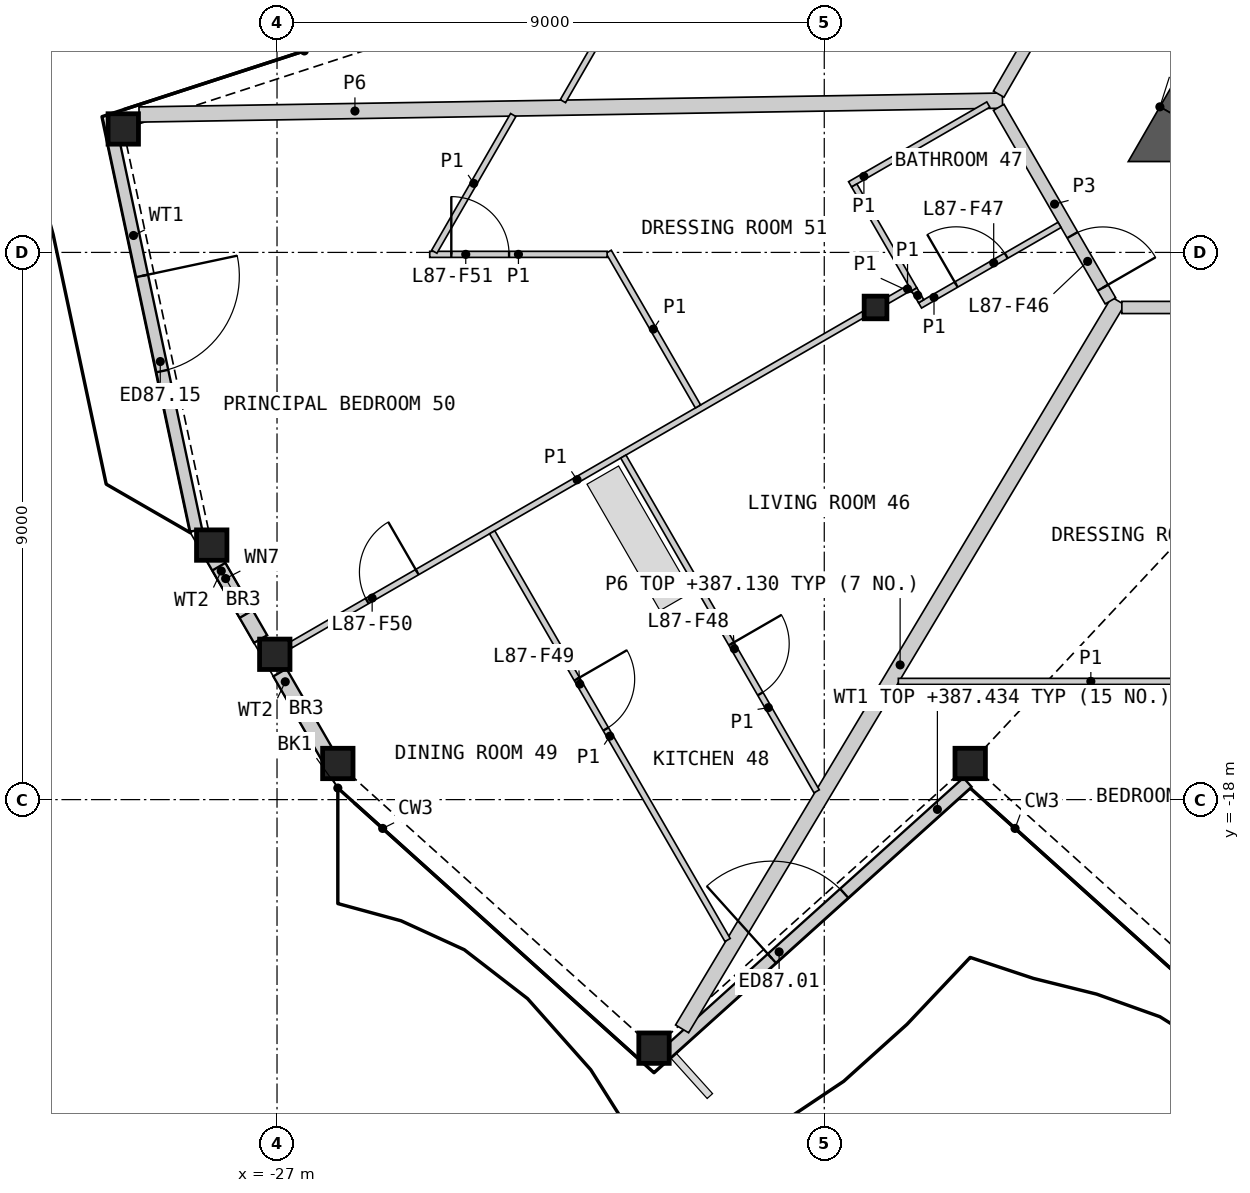
"""IFC4 building model, lengths in metres.
Left out: names, types, materials, properties, quantities, classifications, styles, units other than length and angle.
Written with IfcOpenShell. Run it as: python <this file> out.ifc"""

import sys

from ifc_helpers import new_model, si_unit, direction, frame, frame_2d, origin, origin_2d, place, context, subcontext, project, spatial, polyline, rectangle, hollow_rectangle, i_section, outline, extrude, element, fill, save


model = new_model("IFC4")
c1 = context("Model", 3, precision=1e-05, world=origin(), true_north=direction((0.0, 1.0)))
c2 = subcontext(c1, "Body", "Model", "MODEL_VIEW")
j1 = project(units=[si_unit("LENGTHUNIT", "METRE"), si_unit("PLANEANGLEUNIT", "RADIAN")], contexts=[c1])
p1 = place(None, origin())
s1 = spatial("IfcSite", under=j1, at=p1, CompositionType="ELEMENT")
p2 = place(p1, origin())
s2 = spatial("IfcBuilding", under=s1, at=p2, CompositionType="ELEMENT")
p3 = place(p2, frame((0.0, 0.0, 384.8)))
s3 = spatial("IfcBuildingStorey", under=s2, at=p3, CompositionType="ELEMENT", Elevation=384.8)
for number, where, z_axis, x_axis in (
    (1, (-26.0, -17.406, 0.0), (0.0, 0.0, 1.0), (1.0, 0.0, 0.0)),
    (2, (-20.8, -22.088, 0.0), (0.0, 0.0, 1.0), (1.0, 0.0, 0.0)),
    (3, (-15.6, -17.406, 0.0), (0.0, 0.0, 1.0), (1.0, 0.0, 0.0)),
    (4, (-29.529, -6.969, 0.0), (0.0, 0.0, 1.0), (1.0, 0.0, 0.0)),
    (5, (-28.074, -13.814, 0.0), (0.0, 0.0, 1.0), (1.0, 0.0, 0.0)),
    (6, (-27.037, -15.61, 0.0), (0.0, 0.0, 1.0), (1.0, 0.0, 0.0)),
):
    element("IfcColumn", number, at=place(p3, frame(where, z_axis=z_axis, x_axis=x_axis)), inside=s3, PredefinedType="COLUMN", context=c2, shape_type="SweptSolid", body=[
        extrude(hollow_rectangle(XDim=0.5, YDim=0.5, WallThickness=0.03, at=origin_2d()), origin(), (0.0, 0.0, 1.0), 3.4),
    ])
p4 = place(p3, frame((-17.157, -9.906, 0.0), z_axis=(0.0, 0.0, 1.0), x_axis=(1.0, 0.0, 0.0)))
e7 = element("IfcColumn", 7, at=p4, inside=s3, PredefinedType="COLUMN", context=c2, shape_type="SweptSolid", body=[
    extrude(i_section(OverallWidth=0.374, OverallDepth=0.372, WebThickness=0.016, FlangeThickness=0.026, at=origin_2d()), origin(), (0.0, 0.0, 1.0), 3.4),
])
p5 = place(p3, frame((-20.595, -22.173, 0.0), z_axis=(0.0, 0.0, 1.0), x_axis=(0.743135582201, 0.669140871915, 0.0)))
e8 = element("IfcWall", 8, at=p5, inside=s3, PredefinedType="SOLIDWALL", context=c2, shape_type="SweptSolid", body=[
    extrude(rectangle(XDim=6.662, YDim=0.2, at=frame_2d((3.331, 0.0))), origin(), (0.0, 0.0, 1.0), 2.634),
])
p6 = place(p5, frame((2.333, 0.0, 0.0)))
e9 = element("IfcOpeningElement", 9, at=p6, cuts=e8, PredefinedType="OPENING", context=c2, shape_type="SweptSolid", body=[
    extrude(rectangle(XDim=1.6, YDim=2.25, at=frame_2d((0.8, 1.125))), frame((0.0, 0.11, 0.0), z_axis=(0.0, -1.0, 0.0), x_axis=(1.0, 0.0, 0.0)), (0.0, 0.0, 1.0), 0.22),
])
p7 = place(p3, frame((-29.705, -7.105, 0.0), z_axis=(0.0, 0.0, 1.0), x_axis=(0.207924998532, -0.978144771997, 0.0)))
e10 = element("IfcWall", 10, at=p7, inside=s3, PredefinedType="SOLIDWALL", context=c2, shape_type="SweptSolid", body=[
    extrude(rectangle(XDim=6.612, YDim=0.2, at=frame_2d((3.306, 0.0))), origin(), (0.0, 0.0, 1.0), 2.634),
])
p8 = place(p7, frame((2.333, 0.0, 0.0)))
e11 = element("IfcOpeningElement", 11, at=p8, cuts=e10, PredefinedType="OPENING", context=c2, shape_type="SweptSolid", body=[
    extrude(rectangle(XDim=1.6, YDim=2.25, at=frame_2d((0.8, 1.125))), frame((0.0, 0.11, 0.0), z_axis=(0.0, -1.0, 0.0), x_axis=(1.0, 0.0, 0.0)), (0.0, 0.0, 1.0), 0.22),
])
p9 = place(p3, frame((-28.132, -13.866, 0.0), z_axis=(0.0, 0.0, 1.0), x_axis=(0.499975693202, -0.866039436866, 0.0)))
e12 = element("IfcWall", 12, at=p9, inside=s3, PredefinedType="SOLIDWALL", context=c2, shape_type="SweptSolid", body=[
    extrude(rectangle(XDim=1.725, YDim=0.25, at=frame_2d((0.862, 0.0))), origin(), (0.0, 0.0, 1.0), 2.634),
])
p10 = place(p9, frame((0.35, 0.0, 1.8)))
e13 = element("IfcOpeningElement", 13, at=p10, cuts=e12, PredefinedType="OPENING", context=c2, shape_type="SweptSolid", body=[
    extrude(rectangle(XDim=0.9, YDim=0.6, at=frame_2d((0.45, 0.3))), frame((0.0, 0.135, 0.0), z_axis=(0.0, -1.0, 0.0), x_axis=(1.0, 0.0, 0.0)), (0.0, 0.0, 1.0), 0.27),
])
p11 = place(p3, frame((-26.953, -15.91, 0.0), z_axis=(0.0, 0.0, 1.0), x_axis=(0.500027377864, -0.86600959659, 0.0)))
e14 = element("IfcWall", 14, at=p11, inside=s3, PredefinedType="SOLIDWALL", context=c2, shape_type="SweptSolid", body=[
    extrude(rectangle(XDim=1.756, YDim=0.25, at=frame_2d((0.878, 0.0))), origin(), (0.0, 0.0, 1.0), 2.634),
])
p12 = place(p3, frame((-9.562, -2.15, 0.0), z_axis=(0.0, 0.0, 1.0), x_axis=(-0.500015214976, -0.866016619236, 0.0)))
e15 = element("IfcWall", 15, at=p12, inside=s3, PredefinedType="SHEAR", context=c2, shape_type="SweptSolid", body=[
    extrude(rectangle(XDim=5.318, YDim=0.6, at=frame_2d((2.659, 0.0))), origin(), (0.0, 0.0, 1.0), 3.1),
])
p13 = place(p3, origin())
e16 = element("IfcWall", 16, at=p13, inside=s3, PredefinedType="SHEAR", context=c2, shape_type="SweptSolid", body=[
    extrude(outline(polyline([(-12.48, -6.606), (-11.961, -6.906), (-11.961, -7.506), (-13.0, -7.506), (-12.48, -6.606)])), origin(), (0.0, 0.0, 1.0), 3.1),
])
p14 = place(p3, frame((-20.338, -21.771, 0.0), z_axis=(0.0, 0.0, 1.0), x_axis=(0.513878217441, 0.857863146218, 0.0)))
e17 = element("IfcWall", 17, at=p14, inside=s3, PredefinedType="PARTITIONING", context=c2, shape_type="SweptSolid", body=[
    extrude(rectangle(XDim=13.956, YDim=0.25, at=frame_2d((6.978, 0.0))), origin(), (0.0, 0.0, 1.0), 2.33),
])
p15 = place(p3, frame((-29.269, -6.732, 0.0), z_axis=(0.0, 0.0, 1.0), x_axis=(0.999870533117, 0.016090898164, 0.0)))
e18 = element("IfcWall", 18, at=p15, inside=s3, PredefinedType="PARTITIONING", context=c2, shape_type="SweptSolid", body=[
    extrude(rectangle(XDim=14.202, YDim=0.25, at=frame_2d((7.101, 0.0))), origin(), (0.0, 0.0, 1.0), 2.33),
])
p16 = place(p3, frame((-13.106, -9.906, 0.0), z_axis=(0.0, 0.0, 1.0), x_axis=(1.0, 0.0, 0.0)))
e19 = element("IfcWall", 19, at=p16, inside=s3, PredefinedType="PARTITIONING", context=c2, shape_type="SweptSolid", body=[
    extrude(rectangle(XDim=4.331, YDim=0.2, at=frame_2d((2.165, 0.0))), origin(), (0.0, 0.0, 1.0), 3.1),
])
p17 = place(p3, frame((-15.131, -6.397, 0.0), z_axis=(0.0, 0.0, 1.0), x_axis=(0.499986217557, 0.866033360935, 0.0)))
e20 = element("IfcWall", 20, at=p17, inside=s3, PredefinedType="PARTITIONING", context=c2, shape_type="SweptSolid", body=[
    extrude(rectangle(XDim=4.3, YDim=0.2, at=frame_2d((2.15, 0.0))), origin(), (0.0, 0.0, 1.0), 3.1),
])
p18 = place(p3, frame((-15.131, -6.614, 0.0), z_axis=(0.0, 0.0, 1.0), x_axis=(0.499967746641, -0.866044024469, 0.0)))
e21 = element("IfcWall", 21, at=p18, inside=s3, PredefinedType="PARTITIONING", context=c2, shape_type="SweptSolid", body=[
    extrude(rectangle(XDim=3.676, YDim=0.2, at=frame_2d((1.838, 0.0))), origin(), (0.0, 0.0, 1.0), 3.1),
])
p19 = place(p18, frame((2.426, 0.0, 0.0)))
e22 = element("IfcOpeningElement", 22, at=p19, cuts=e21, PredefinedType="OPENING", context=c2, shape_type="SweptSolid", body=[
    extrude(rectangle(XDim=1.0, YDim=2.1, at=frame_2d((0.5, 1.05))), frame((0.0, 0.11, 0.0), z_axis=(0.0, -1.0, 0.0), x_axis=(1.0, 0.0, 0.0)), (0.0, 0.0, 1.0), 0.22),
])
p20 = place(p3, frame((-26.777, -15.46, 0.0), z_axis=(0.0, 0.0, 1.0), x_axis=(0.866019680922, 0.500009912158, 0.0)))
e23 = element("IfcWall", 23, at=p20, inside=s3, PredefinedType="PARTITIONING", context=c2, shape_type="SweptSolid", body=[
    extrude(rectangle(XDim=10.881, YDim=0.1, at=frame_2d((5.44, 0.0))), origin(), (0.0, 0.0, 1.0), 2.33),
])
p21 = place(p20, frame((1.454, 0.0, 0.0)))
e24 = element("IfcOpeningElement", 24, at=p21, cuts=e23, PredefinedType="OPENING", context=c2, shape_type="SweptSolid", body=[
    extrude(rectangle(XDim=0.95, YDim=2.1, at=frame_2d((0.475, 1.05))), frame((0.0, 0.06, 0.0), z_axis=(0.0, -1.0, 0.0), x_axis=(1.0, 0.0, 0.0)), (0.0, 0.0, 1.0), 0.12),
])
p22 = place(p3, frame((-23.462, -13.603, 0.0), z_axis=(0.0, 0.0, 1.0), x_axis=(0.499998111909, -0.866026493871, 0.0)))
e25 = element("IfcWall", 25, at=p22, inside=s3, PredefinedType="PARTITIONING", context=c2, shape_type="SweptSolid", body=[
    extrude(rectangle(XDim=7.743, YDim=0.1, at=frame_2d((3.872, 0.0))), origin(), (0.0, 0.0, 1.0), 2.33),
])
p23 = place(p22, frame((2.788, 0.0, 0.0)))
e26 = element("IfcOpeningElement", 26, at=p23, cuts=e25, PredefinedType="OPENING", context=c2, shape_type="SweptSolid", body=[
    extrude(rectangle(XDim=0.95, YDim=2.1, at=frame_2d((0.475, 1.05))), frame((0.0, 0.06, 0.0), z_axis=(0.0, -1.0, 0.0), x_axis=(1.0, 0.0, 0.0)), (0.0, 0.0, 1.0), 0.12),
])
p24 = place(p3, frame((-21.304, -12.358, 0.0), z_axis=(0.0, 0.0, 1.0), x_axis=(0.500000558108, -0.866025081561, 0.0)))
e27 = element("IfcWall", 27, at=p24, inside=s3, PredefinedType="PARTITIONING", context=c2, shape_type="SweptSolid", body=[
    extrude(rectangle(XDim=6.358, YDim=0.1, at=frame_2d((3.179, 0.0))), origin(), (0.0, 0.0, 1.0), 2.33),
])
p25 = place(p24, frame((3.555, 0.0, 0.0)))
e28 = element("IfcOpeningElement", 28, at=p25, cuts=e27, PredefinedType="OPENING", context=c2, shape_type="SweptSolid", body=[
    extrude(rectangle(XDim=0.95, YDim=2.1, at=frame_2d((0.475, 1.05))), frame((0.0, 0.06, 0.0), z_axis=(0.0, -1.0, 0.0), x_axis=(1.0, 0.0, 0.0)), (0.0, 0.0, 1.0), 0.12),
])
p26 = place(p3, frame((-22.298, -6.512, 0.0), z_axis=(0.0, 0.0, 1.0), x_axis=(0.499991387631, 0.866030376081, 0.0)))
e29 = element("IfcWall", 29, at=p26, inside=s3, PredefinedType="PARTITIONING", context=c2, shape_type="SweptSolid", body=[
    extrude(rectangle(XDim=6.339, YDim=0.1, at=frame_2d((3.169, 0.0))), origin(), (0.0, 0.0, 1.0), 2.33),
])
p27 = place(p26, frame((3.0, 0.0, 0.0)))
e30 = element("IfcOpeningElement", 30, at=p27, cuts=e29, PredefinedType="OPENING", context=c2, shape_type="SweptSolid", body=[
    extrude(rectangle(XDim=0.95, YDim=2.1, at=frame_2d((0.475, 1.05))), frame((0.0, 0.06, 0.0), z_axis=(0.0, -1.0, 0.0), x_axis=(1.0, 0.0, 0.0)), (0.0, 0.0, 1.0), 0.12),
])
p28 = place(p3, frame((-16.781, -16.055, 0.0), z_axis=(0.0, 0.0, 1.0), x_axis=(1.0, 0.0, 0.0)))
e31 = element("IfcWall", 31, at=p28, inside=s3, PredefinedType="PARTITIONING", context=c2, shape_type="SweptSolid", body=[
    extrude(rectangle(XDim=6.332, YDim=0.1, at=frame_2d((3.166, 0.0))), origin(), (0.0, 0.0, 1.0), 2.33),
])
p29 = place(p28, frame((4.623, 0.0, 0.0)))
e32 = element("IfcOpeningElement", 32, at=p29, cuts=e31, PredefinedType="OPENING", context=c2, shape_type="SweptSolid", body=[
    extrude(rectangle(XDim=0.95, YDim=2.1, at=frame_2d((0.475, 1.05))), frame((0.0, 0.06, 0.0), z_axis=(0.0, -1.0, 0.0), x_axis=(1.0, 0.0, 0.0)), (0.0, 0.0, 1.0), 0.12),
])
p30 = place(p3, frame((-21.546, -8.989, 0.0), z_axis=(0.0, 0.0, 1.0), x_axis=(0.499919039967, -0.866072141036, 0.0)))
e33 = element("IfcWall", 33, at=p30, inside=s3, PredefinedType="PARTITIONING", context=c2, shape_type="SweptSolid", body=[
    extrude(rectangle(XDim=2.938, YDim=0.1, at=frame_2d((1.469, 0.0))), origin(), (0.0, 0.0, 1.0), 2.33),
])
p31 = place(p3, frame((-24.489, -9.032, 0.0), z_axis=(0.0, 0.0, 1.0), x_axis=(1.0, 0.0, 0.0)))
e34 = element("IfcWall", 34, at=p31, inside=s3, PredefinedType="PARTITIONING", context=c2, shape_type="SweptSolid", body=[
    extrude(rectangle(XDim=2.917, YDim=0.1, at=frame_2d((1.459, 0.0))), origin(), (0.0, 0.0, 1.0), 2.33),
])
p32 = place(p31, frame((0.355, 0.0, 0.0)))
e35 = element("IfcOpeningElement", 35, at=p32, cuts=e34, PredefinedType="OPENING", context=c2, shape_type="SweptSolid", body=[
    extrude(rectangle(XDim=0.95, YDim=2.1, at=frame_2d((0.475, 1.05))), frame((0.0, 0.06, 0.0), z_axis=(0.0, -1.0, 0.0), x_axis=(1.0, 0.0, 0.0)), (0.0, 0.0, 1.0), 0.12),
])
p33 = place(p3, frame((-24.414, -8.989, 0.0), z_axis=(0.0, 0.0, 1.0), x_axis=(0.500042595688, 0.866000809756, 0.0)))
e36 = element("IfcWall", 36, at=p33, inside=s3, PredefinedType="PARTITIONING", context=c2, shape_type="SweptSolid", body=[
    extrude(rectangle(XDim=2.596, YDim=0.1, at=frame_2d((1.298, 0.0))), origin(), (0.0, 0.0, 1.0), 2.33),
])
p34 = place(p3, frame((-17.575, -7.881, 0.0), z_axis=(0.0, 0.0, 1.0), x_axis=(0.866036909293, 0.499980071345, 0.0)))
e37 = element("IfcWall", 37, at=p34, inside=s3, PredefinedType="PARTITIONING", context=c2, shape_type="SweptSolid", body=[
    extrude(rectangle(XDim=2.625, YDim=0.1, at=frame_2d((1.312, 0.0))), origin(), (0.0, 0.0, 1.0), 2.33),
])
p35 = place(p3, frame((-16.425, -9.872, 0.0), z_axis=(0.0, 0.0, 1.0), x_axis=(0.86603978909, 0.499975083092, 0.0)))
e38 = element("IfcWall", 38, at=p35, inside=s3, PredefinedType="PARTITIONING", context=c2, shape_type="SweptSolid", body=[
    extrude(rectangle(XDim=2.649, YDim=0.1, at=frame_2d((1.325, 0.0))), origin(), (0.0, 0.0, 1.0), 2.33),
])
p36 = place(p35, frame((0.686, 0.0, 0.0)))
e39 = element("IfcOpeningElement", 39, at=p36, cuts=e38, PredefinedType="OPENING", context=c2, shape_type="SweptSolid", body=[
    extrude(rectangle(XDim=0.95, YDim=2.1, at=frame_2d((0.475, 1.05))), frame((0.0, 0.06, 0.0), z_axis=(0.0, -1.0, 0.0), x_axis=(1.0, 0.0, 0.0)), (0.0, 0.0, 1.0), 0.12),
])
p37 = place(p3, frame((-17.507, -7.899, 0.0), z_axis=(0.0, 0.0, 1.0), x_axis=(0.500011643316, -0.866018681408, 0.0)))
e40 = element("IfcWall", 40, at=p37, inside=s3, PredefinedType="PARTITIONING", context=c2, shape_type="SweptSolid", body=[
    extrude(rectangle(XDim=1.973, YDim=0.1, at=frame_2d((0.987, 0.0))), origin(), (0.0, 0.0, 1.0), 2.33),
])
p38 = place(p3, frame((-16.96, -9.792, 0.0), z_axis=(0.0, 0.0, 1.0), x_axis=(0.866137484628, 0.499805820016, 0.0)))
e41 = element("IfcWall", 41, at=p38, inside=s3, PredefinedType="PARTITIONING", context=c2, shape_type="SweptSolid", body=[
    extrude(rectangle(XDim=0.423, YDim=0.1, at=frame_2d((0.211, 0.0))), origin(), (0.0, 0.0, 1.0), 2.33),
])
p39 = place(p3, frame((-16.519, -9.61, 0.0), z_axis=(0.0, 0.0, 1.0), x_axis=(0.50245032488, -0.864606078528, 0.0)))
e42 = element("IfcWall", 42, at=p39, inside=s3, PredefinedType="PARTITIONING", context=c2, shape_type="SweptSolid", body=[
    extrude(rectangle(XDim=0.224, YDim=0.1, at=frame_2d((0.112, 0.0))), origin(), (0.0, 0.0, 1.0), 2.33),
])
p40 = place(p6, origin())
e43 = element("IfcDoor", 43, at=p40, inside=s3, OperationType="DOUBLE_DOOR_SINGLE_SWING", PredefinedType="DOOR", context=c2, shape_type="SweptSolid", body=[
    extrude(rectangle(XDim=1.6, YDim=2.25, at=frame_2d((0.8, 1.125))), frame((0.0, 0.025, 0.0), z_axis=(0.0, -1.0, 0.0), x_axis=(1.0, 0.0, 0.0)), (0.0, 0.0, 1.0), 0.05),
])
fill(e9, e43)
p41 = place(p8, origin())
e44 = element("IfcDoor", 44, at=p41, inside=s3, OperationType="DOUBLE_DOOR_SINGLE_SWING", PredefinedType="DOOR", context=c2, shape_type="SweptSolid", body=[
    extrude(rectangle(XDim=1.6, YDim=2.25, at=frame_2d((0.8, 1.125))), frame((0.0, 0.025, 0.0), z_axis=(0.0, -1.0, 0.0), x_axis=(1.0, 0.0, 0.0)), (0.0, 0.0, 1.0), 0.05),
])
fill(e11, e44)
p42 = place(p10, origin())
e45 = element("IfcWindow", 45, at=p42, inside=s3, PartitioningType="SINGLE_PANEL", PredefinedType="WINDOW", context=c2, shape_type="SweptSolid", body=[
    extrude(rectangle(XDim=0.9, YDim=0.6, at=frame_2d((0.45, 0.3))), frame((0.0, 0.03, 0.0), z_axis=(0.0, -1.0, 0.0), x_axis=(1.0, 0.0, 0.0)), (0.0, 0.0, 1.0), 0.06),
])
fill(e13, e45)
p43 = place(p19, origin())
e46 = element("IfcDoor", 46, at=p43, inside=s3, OperationType="SINGLE_SWING_RIGHT", PredefinedType="DOOR", context=c2, shape_type="SweptSolid", body=[
    extrude(rectangle(XDim=1.0, YDim=2.1, at=frame_2d((0.5, 1.05))), frame((0.0, 0.025, 0.0), z_axis=(0.0, -1.0, 0.0), x_axis=(1.0, 0.0, 0.0)), (0.0, 0.0, 1.0), 0.05),
])
fill(e22, e46)
p44 = place(p36, origin())
e47 = element("IfcDoor", 47, at=p44, inside=s3, OperationType="SINGLE_SWING_LEFT", PredefinedType="DOOR", context=c2, shape_type="SweptSolid", body=[
    extrude(rectangle(XDim=0.95, YDim=2.1, at=frame_2d((0.475, 1.05))), frame((0.0, 0.025, 0.0), z_axis=(0.0, -1.0, 0.0), x_axis=(1.0, 0.0, 0.0)), (0.0, 0.0, 1.0), 0.05),
])
fill(e39, e47)
p45 = place(p25, origin())
e48 = element("IfcDoor", 48, at=p45, inside=s3, OperationType="SINGLE_SWING_LEFT", PredefinedType="DOOR", context=c2, shape_type="SweptSolid", body=[
    extrude(rectangle(XDim=0.95, YDim=2.1, at=frame_2d((0.475, 1.05))), frame((0.0, 0.025, 0.0), z_axis=(0.0, -1.0, 0.0), x_axis=(1.0, 0.0, 0.0)), (0.0, 0.0, 1.0), 0.05),
])
fill(e28, e48)
p46 = place(p23, origin())
e49 = element("IfcDoor", 49, at=p46, inside=s3, OperationType="SINGLE_SWING_LEFT", PredefinedType="DOOR", context=c2, shape_type="SweptSolid", body=[
    extrude(rectangle(XDim=0.95, YDim=2.1, at=frame_2d((0.475, 1.05))), frame((0.0, 0.025, 0.0), z_axis=(0.0, -1.0, 0.0), x_axis=(1.0, 0.0, 0.0)), (0.0, 0.0, 1.0), 0.05),
])
fill(e26, e49)
p47 = place(p21, origin())
e50 = element("IfcDoor", 50, at=p47, inside=s3, OperationType="SINGLE_SWING_RIGHT", PredefinedType="DOOR", context=c2, shape_type="SweptSolid", body=[
    extrude(rectangle(XDim=0.95, YDim=2.1, at=frame_2d((0.475, 1.05))), frame((0.0, 0.025, 0.0), z_axis=(0.0, -1.0, 0.0), x_axis=(1.0, 0.0, 0.0)), (0.0, 0.0, 1.0), 0.05),
])
fill(e24, e50)
p48 = place(p32, origin())
e51 = element("IfcDoor", 51, at=p48, inside=s3, OperationType="SINGLE_SWING_LEFT", PredefinedType="DOOR", context=c2, shape_type="SweptSolid", body=[
    extrude(rectangle(XDim=0.95, YDim=2.1, at=frame_2d((0.475, 1.05))), frame((0.0, 0.025, 0.0), z_axis=(0.0, -1.0, 0.0), x_axis=(1.0, 0.0, 0.0)), (0.0, 0.0, 1.0), 0.05),
])
fill(e35, e51)
save(model, sys.argv[1])
